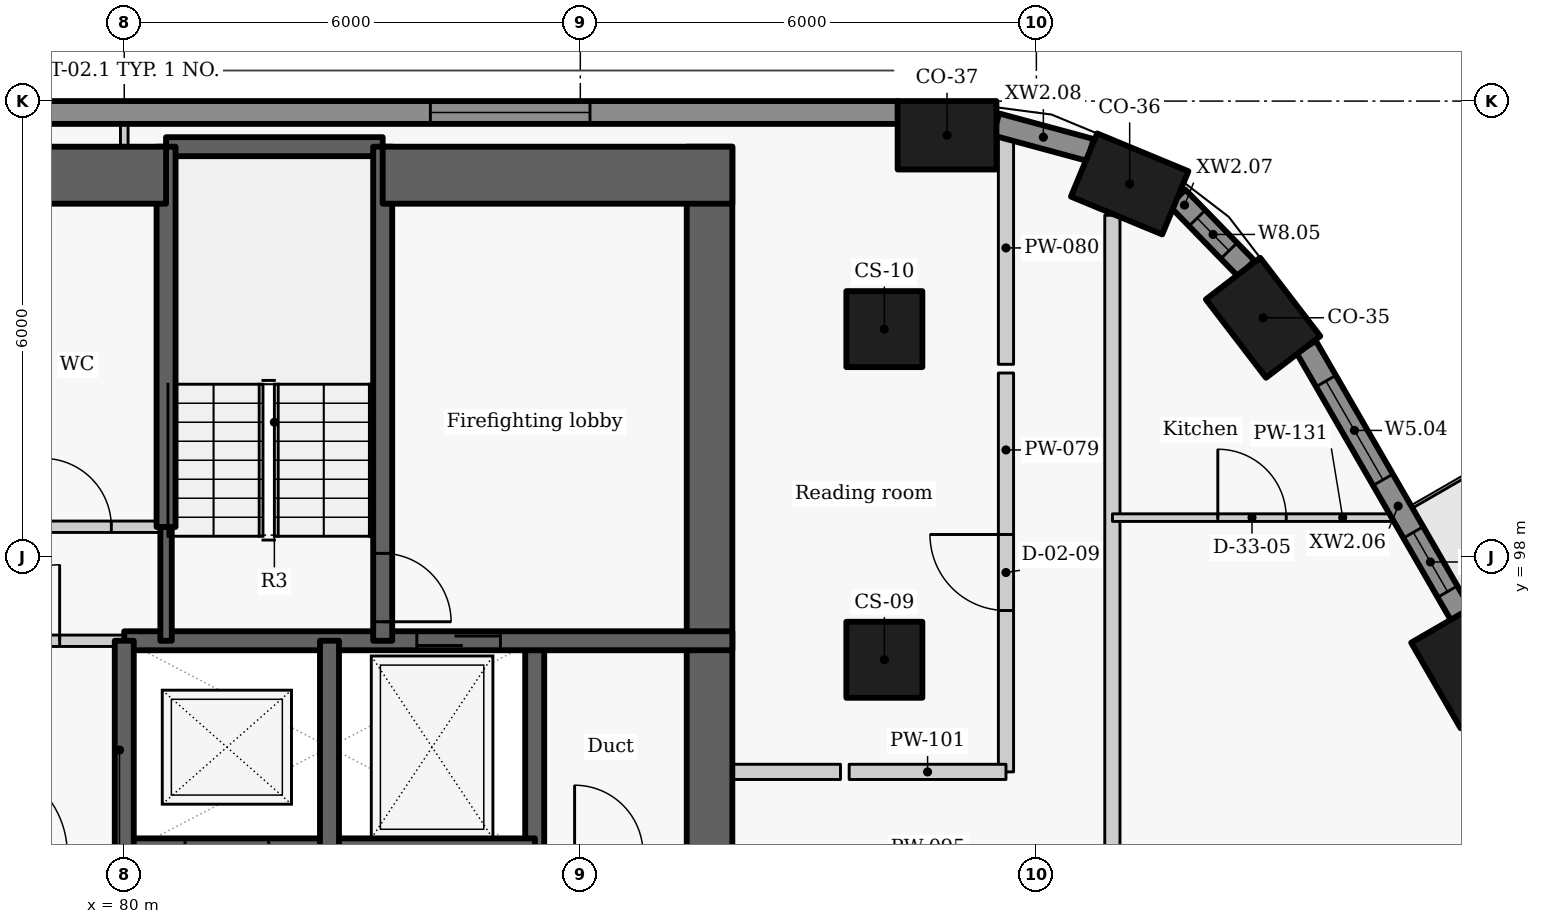
"""IFC4 building model, lengths in metres.
Left out: names, types, materials, properties, quantities, classifications, styles, units other than length and angle.
Written with IfcOpenShell. Run it as: python <this file> out.ifc"""

import sys

from ifc_helpers import new_model, si_unit, direction, frame, frame_2d, origin, origin_2d, place, context, subcontext, project, spatial, rectangle, extrude, element, fill, save


model = new_model("IFC4")
c1 = context("Model", 3, precision=1e-05, world=origin(), true_north=direction((0.0, 1.0)))
c2 = subcontext(c1, "Body", "Model", "MODEL_VIEW")
j1 = project(units=[si_unit("LENGTHUNIT", "METRE"), si_unit("PLANEANGLEUNIT", "RADIAN")], contexts=[c1])
p1 = place(None, origin())
s1 = spatial("IfcSite", under=j1, at=p1, CompositionType="ELEMENT")
p2 = place(p1, origin())
s2 = spatial("IfcBuilding", under=s1, at=p2, CompositionType="ELEMENT")
p3 = place(p2, frame((0.0, 0.0, 160.2)))
s3 = spatial("IfcBuildingStorey", under=s2, at=p3, CompositionType="ELEMENT", Elevation=160.2)
for number, where, z_axis, x_axis in (
    (1, (97.646, 96.537, 0.0), (0.0, 0.0, 1.0), (-0.5, 0.866, 0.0)),
    (2, (94.982, 101.149, 0.0), (0.0, 0.0, 1.0), (-0.609, 0.793, 0.0)),
    (3, (93.227, 102.91, 0.0), (0.0, 0.0, 1.0), (-0.924, 0.383, 0.0)),
    (4, (90.825, 103.55, 0.0), (0.0, 0.0, 1.0), (-1.0, 0.0, 0.0)),
):
    element("IfcColumn", number, at=place(p3, frame(where, z_axis=z_axis, x_axis=x_axis)), inside=s3, PredefinedType="COLUMN", context=c2, shape_type="SweptSolid", body=[
        extrude(rectangle(XDim=1.3, YDim=0.9, at=origin_2d()), origin(), (0.0, 0.0, 1.0), 3.3),
    ])
for number, where, z_axis, x_axis in (
    (5, (90.0, 96.65, 0.0), (0.0, 0.0, 1.0), (0.0, 1.0, 0.0)),
    (6, (90.0, 101.0, 0.0), (0.0, 0.0, 1.0), (0.0, 1.0, 0.0)),
):
    element("IfcColumn", number, at=place(p3, frame(where, z_axis=z_axis, x_axis=x_axis)), inside=s3, PredefinedType="COLUMN", context=c2, shape_type="SweptSolid", body=[
        extrude(rectangle(XDim=1.0, YDim=1.0, at=origin_2d()), origin(), (0.0, 0.0, 1.0), 3.3),
    ])
p4 = place(p3, frame((97.582, 97.247, 0.0), z_axis=(0.0, 0.0, 1.0), x_axis=(-0.500018589245, 0.866014671013, 0.0)))
e7 = element("IfcWall", 7, at=p4, inside=s3, PredefinedType="SOLIDWALL", context=c2, shape_type="SweptSolid", body=[
    extrude(rectangle(XDim=4.068, YDim=0.3, at=frame_2d((2.034, 0.0))), origin(), (0.0, 0.0, 1.0), 2.425),
])
p5 = place(p4, frame((0.346, 0.0, 0.9)))
e8 = element("IfcOpeningElement", 8, at=p5, cuts=e7, PredefinedType="OPENING", context=c2, shape_type="SweptSolid", body=[
    extrude(rectangle(XDim=0.9, YDim=1.1, at=frame_2d((0.45, 0.55))), frame((0.0, 0.16, 0.0), z_axis=(0.0, -1.0, 0.0), x_axis=(1.0, 0.0, 0.0)), (0.0, 0.0, 1.0), 0.32),
])
p6 = place(p4, frame((2.045, 0.0, 0.9)))
e9 = element("IfcOpeningElement", 9, at=p6, cuts=e7, PredefinedType="OPENING", context=c2, shape_type="SweptSolid", body=[
    extrude(rectangle(XDim=1.5, YDim=1.1, at=frame_2d((0.75, 0.55))), frame((0.0, 0.16, 0.0), z_axis=(0.0, -1.0, 0.0), x_axis=(1.0, 0.0, 0.0)), (0.0, 0.0, 1.0), 0.32),
])
p7 = place(p3, frame((94.763, 101.795, 0.0), z_axis=(0.0, 0.0, 1.0), x_axis=(-0.697598997785, 0.716488407645, 0.0)))
e10 = element("IfcWall", 10, at=p7, inside=s3, PredefinedType="SOLIDWALL", context=c2, shape_type="SweptSolid", body=[
    extrude(rectangle(XDim=1.305, YDim=0.3, at=frame_2d((0.653, 0.0))), origin(), (0.0, 0.0, 1.0), 2.425),
])
p8 = place(p7, frame((0.328, 0.0, 0.9)))
e11 = element("IfcOpeningElement", 11, at=p8, cuts=e10, PredefinedType="OPENING", context=c2, shape_type="SweptSolid", body=[
    extrude(rectangle(XDim=0.6, YDim=1.1, at=frame_2d((0.3, 0.55))), frame((0.0, 0.16, 0.0), z_axis=(0.0, -1.0, 0.0), x_axis=(1.0, 0.0, 0.0)), (0.0, 0.0, 1.0), 0.32),
])
p9 = place(p3, frame((92.713, 103.356, 0.0), z_axis=(0.0, 0.0, 1.0), x_axis=(-0.965274225809, 0.26123872031, 0.0)))
e12 = element("IfcWall", 12, at=p9, inside=s3, PredefinedType="SOLIDWALL", context=c2, shape_type="SweptSolid", body=[
    extrude(rectangle(XDim=1.287, YDim=0.3, at=frame_2d((0.644, 0.0))), origin(), (0.0, 0.0, 1.0), 2.425),
])
p10 = place(p3, frame((90.179, 103.85, 0.0), z_axis=(0.0, 0.0, 1.0), x_axis=(-1.0, 0.0, 0.0)))
e13 = element("IfcWall", 13, at=p10, inside=s3, PredefinedType="SOLIDWALL", context=c2, shape_type="SweptSolid", body=[
    extrude(rectangle(XDim=20.391, YDim=0.3, at=frame_2d((10.196, 0.0))), origin(), (0.0, 0.0, 1.0), 2.425),
])
p11 = place(p10, frame((4.051, 0.0, 0.9)))
e14 = element("IfcOpeningElement", 14, at=p11, cuts=e13, PredefinedType="OPENING", context=c2, shape_type="SweptSolid", body=[
    extrude(rectangle(XDim=2.1, YDim=1.1, at=frame_2d((1.05, 0.55))), frame((0.0, 0.16, 0.0), z_axis=(0.0, -1.0, 0.0), x_axis=(1.0, 0.0, 0.0)), (0.0, 0.0, 1.0), 0.32),
])
p12 = place(p10, frame((14.212, 0.0, 0.9)))
e15 = element("IfcOpeningElement", 15, at=p12, cuts=e13, PredefinedType="OPENING", context=c2, shape_type="SweptSolid", body=[
    extrude(rectangle(XDim=2.1, YDim=1.1, at=frame_2d((1.05, 0.55))), frame((0.0, 0.16, 0.0), z_axis=(0.0, -1.0, 0.0), x_axis=(1.0, 0.0, 0.0)), (0.0, 0.0, 1.0), 0.32),
])
p13 = place(p3, frame((85.4, 94.1, -0.275), z_axis=(0.0, 0.0, 1.0), x_axis=(0.0, 1.0, 0.0)))
e16 = element("IfcWall", 16, at=p13, inside=s3, PredefinedType="SHEAR", context=c2, shape_type="SweptSolid", body=[
    extrude(rectangle(XDim=2.8, YDim=0.25, at=frame_2d((1.4, 0.0))), origin(), (0.0, 0.0, 1.0), 3.3),
])
p14 = place(p3, frame((87.7, 103.4, -0.275), z_axis=(0.0, 0.0, 1.0), x_axis=(0.0, -1.0, 0.0)))
e17 = element("IfcWall", 17, at=p14, inside=s3, PredefinedType="SHEAR", context=c2, shape_type="SweptSolid", body=[
    extrude(rectangle(XDim=15.6, YDim=0.6, at=frame_2d((7.8, 0.0))), origin(), (0.0, 0.0, 1.0), 3.3),
])
p15 = place(p14, frame((10.248, 0.0, 0.275)))
e18 = element("IfcOpeningElement", 18, at=p15, cuts=e17, PredefinedType="OPENING", context=c2, shape_type="SweptSolid", body=[
    extrude(rectangle(XDim=1.5, YDim=2.1, at=frame_2d((0.75, 1.05))), frame((0.0, 0.31, 0.0), z_axis=(0.0, -1.0, 0.0), x_axis=(1.0, 0.0, 0.0)), (0.0, 0.0, 1.0), 0.62),
])
p16 = place(p3, frame((79.997, 94.1, -0.275), z_axis=(0.0, 0.0, 1.0), x_axis=(1.0, 0.0, 0.0)))
e19 = element("IfcWall", 19, at=p16, inside=s3, PredefinedType="SHEAR", context=c2, shape_type="SweptSolid", body=[
    extrude(rectangle(XDim=5.406, YDim=0.4, at=frame_2d((2.703, 0.0))), origin(), (0.0, 0.0, 1.0), 3.3),
])
p17 = place(p16, frame((0.803, 0.0, 0.275)))
e20 = element("IfcOpeningElement", 20, at=p17, cuts=e19, PredefinedType="OPENING", context=c2, shape_type="SweptSolid", body=[
    extrude(rectangle(XDim=1.1, YDim=2.1, at=frame_2d((0.55, 1.05))), frame((0.0, 0.21, 0.0), z_axis=(0.0, -1.0, 0.0), x_axis=(1.0, 0.0, 0.0)), (0.0, 0.0, 1.0), 0.42),
])
p18 = place(p3, frame((80.0, 96.9, -0.275), z_axis=(0.0, 0.0, 1.0), x_axis=(1.0, 0.0, 0.0)))
e21 = element("IfcWall", 21, at=p18, inside=s3, PredefinedType="SHEAR", context=c2, shape_type="SweptSolid", body=[
    extrude(rectangle(XDim=8.0, YDim=0.25, at=frame_2d((4.0, 0.0))), origin(), (0.0, 0.0, 1.0), 3.3),
])
p19 = place(p18, frame((3.849, 0.0, 0.275)))
e22 = element("IfcOpeningElement", 22, at=p19, cuts=e21, PredefinedType="OPENING", context=c2, shape_type="SweptSolid", body=[
    extrude(rectangle(XDim=1.1, YDim=2.1, at=frame_2d((0.55, 1.05))), frame((0.0, 0.135, 0.0), z_axis=(0.0, -1.0, 0.0), x_axis=(1.0, 0.0, 0.0)), (0.0, 0.0, 1.0), 0.27),
])
p20 = place(p3, frame((80.0, 94.1, -0.275), z_axis=(0.0, 0.0, 1.0), x_axis=(0.0, 1.0, 0.0)))
e23 = element("IfcWall", 23, at=p20, inside=s3, PredefinedType="SHEAR", context=c2, shape_type="SweptSolid", body=[
    extrude(rectangle(XDim=2.8, YDim=0.25, at=frame_2d((1.4, 0.0))), origin(), (0.0, 0.0, 1.0), 3.3),
])
p21 = place(p3, frame((77.3, 96.9, 0.0), z_axis=(0.0, 0.0, 1.0), x_axis=(1.0, 0.0, 0.0)))
e24 = element("IfcWall", 24, at=p21, inside=s3, PredefinedType="PARTITIONING", context=c2, shape_type="SweptSolid", body=[
    extrude(rectangle(XDim=2.7, YDim=0.15, at=frame_2d((1.35, 0.0))), origin(), (0.0, 0.0, 1.0), 3.025),
])
p22 = place(p21, frame((0.85, 0.0, 0.0)))
e25 = element("IfcOpeningElement", 25, at=p22, cuts=e24, PredefinedType="OPENING", context=c2, shape_type="SweptSolid", body=[
    extrude(rectangle(XDim=1.0, YDim=2.1, at=frame_2d((0.5, 1.05))), frame((0.0, 0.085, 0.0), z_axis=(0.0, -1.0, 0.0), x_axis=(1.0, 0.0, 0.0)), (0.0, 0.0, 1.0), 0.17),
])
p23 = place(p3, frame((82.7, 94.1, -0.275), z_axis=(0.0, 0.0, 1.0), x_axis=(0.0, 1.0, 0.0)))
e26 = element("IfcWall", 26, at=p23, inside=s3, PredefinedType="SHEAR", context=c2, shape_type="SweptSolid", body=[
    extrude(rectangle(XDim=2.8, YDim=0.25, at=frame_2d((1.4, 0.0))), origin(), (0.0, 0.0, 1.0), 3.3),
])
p24 = place(p3, frame((80.55, 103.4, -0.275), z_axis=(0.0, 0.0, 1.0), x_axis=(1.0, 0.0, 0.0)))
e27 = element("IfcWall", 27, at=p24, inside=s3, PredefinedType="SHEAR", context=c2, shape_type="SweptSolid", body=[
    extrude(rectangle(XDim=2.85, YDim=0.25, at=frame_2d((1.425, 0.0))), origin(), (0.0, 0.0, 1.0), 3.3),
])
p25 = place(p3, frame((83.4, 103.4, -0.275), z_axis=(0.0, 0.0, 1.0), x_axis=(0.0, -1.0, 0.0)))
e28 = element("IfcWall", 28, at=p25, inside=s3, PredefinedType="SHEAR", context=c2, shape_type="SweptSolid", body=[
    extrude(rectangle(XDim=6.5, YDim=0.25, at=frame_2d((3.25, 0.0))), origin(), (0.0, 0.0, 1.0), 3.3),
])
p26 = place(p25, frame((5.35, 0.0, 0.275)))
e29 = element("IfcOpeningElement", 29, at=p26, cuts=e28, PredefinedType="OPENING", context=c2, shape_type="SweptSolid", body=[
    extrude(rectangle(XDim=0.9, YDim=2.1, at=frame_2d((0.45, 1.05))), frame((0.0, 0.135, 0.0), z_axis=(0.0, -1.0, 0.0), x_axis=(1.0, 0.0, 0.0)), (0.0, 0.0, 1.0), 0.27),
])
p27 = place(p3, frame((80.55, 96.9, -0.275), z_axis=(0.0, 0.0, 1.0), x_axis=(0.0, 1.0, 0.0)))
e30 = element("IfcWall", 30, at=p27, inside=s3, PredefinedType="SHEAR", context=c2, shape_type="SweptSolid", body=[
    extrude(rectangle(XDim=1.503, YDim=0.15, at=frame_2d((0.751, 0.0))), origin(), (0.0, 0.0, 1.0), 3.3),
])
p28 = place(p3, frame((80.55, 98.397, -0.275), z_axis=(0.0, 0.0, 1.0), x_axis=(0.0, 1.0, 0.0)))
e31 = element("IfcWall", 31, at=p28, inside=s3, PredefinedType="SHEAR", context=c2, shape_type="SweptSolid", body=[
    extrude(rectangle(XDim=5.003, YDim=0.25, at=frame_2d((2.501, 0.0))), origin(), (0.0, 0.0, 1.0), 3.3),
])
p29 = place(p3, frame((75.35, 103.025, -0.275), z_axis=(0.0, 0.0, 1.0), x_axis=(1.0, 0.0, 0.0)))
e32 = element("IfcWall", 32, at=p29, inside=s3, PredefinedType="SHEAR", context=c2, shape_type="SweptSolid", body=[
    extrude(rectangle(XDim=5.2, YDim=0.75, at=frame_2d((2.6, 0.0))), origin(), (0.0, 0.0, 1.0), 3.3),
])
p30 = place(p3, frame((83.4, 103.025, -0.275), z_axis=(0.0, 0.0, 1.0), x_axis=(1.0, 0.0, 0.0)))
e33 = element("IfcWall", 33, at=p30, inside=s3, PredefinedType="SHEAR", context=c2, shape_type="SweptSolid", body=[
    extrude(rectangle(XDim=4.6, YDim=0.75, at=frame_2d((2.3, 0.0))), origin(), (0.0, 0.0, 1.0), 3.3),
])
p31 = place(p3, frame((75.35, 98.4, 0.0), z_axis=(0.0, 0.0, 1.0), x_axis=(1.0, 0.0, 0.0)))
e34 = element("IfcWall", 34, at=p31, inside=s3, PredefinedType="PARTITIONING", context=c2, shape_type="SweptSolid", body=[
    extrude(rectangle(XDim=5.2, YDim=0.15, at=frame_2d((2.6, 0.0))), origin(), (0.0, 0.0, 1.0), 3.025),
])
p32 = place(p31, frame((0.2, 0.0, 0.0)))
e35 = element("IfcOpeningElement", 35, at=p32, cuts=e34, PredefinedType="OPENING", context=c2, shape_type="SweptSolid", body=[
    extrude(rectangle(XDim=0.9, YDim=2.1, at=frame_2d((0.45, 1.05))), frame((0.0, 0.085, 0.0), z_axis=(0.0, -1.0, 0.0), x_axis=(1.0, 0.0, 0.0)), (0.0, 0.0, 1.0), 0.17),
])
p33 = place(p31, frame((1.63, 0.0, 0.0)))
e36 = element("IfcOpeningElement", 36, at=p33, cuts=e34, PredefinedType="OPENING", context=c2, shape_type="SweptSolid", body=[
    extrude(rectangle(XDim=0.9, YDim=2.1, at=frame_2d((0.45, 1.05))), frame((0.0, 0.085, 0.0), z_axis=(0.0, -1.0, 0.0), x_axis=(1.0, 0.0, 0.0)), (0.0, 0.0, 1.0), 0.17),
])
p34 = place(p31, frame((3.58, 0.0, 0.0)))
e37 = element("IfcOpeningElement", 37, at=p34, cuts=e34, PredefinedType="OPENING", context=c2, shape_type="SweptSolid", body=[
    extrude(rectangle(XDim=0.9, YDim=2.1, at=frame_2d((0.45, 1.05))), frame((0.0, 0.085, 0.0), z_axis=(0.0, -1.0, 0.0), x_axis=(1.0, 0.0, 0.0)), (0.0, 0.0, 1.0), 0.17),
])
p35 = place(p3, frame((91.6, 95.175, 0.0), z_axis=(0.0, 0.0, 1.0), x_axis=(0.0, 1.0, 0.0)))
e38 = element("IfcWall", 38, at=p35, inside=s3, PredefinedType="PARTITIONING", context=c2, shape_type="SweptSolid", body=[
    extrude(rectangle(XDim=5.248, YDim=0.2, at=frame_2d((2.624, 0.0))), origin(), (0.0, 0.0, 1.0), 3.025),
])
p36 = place(p35, frame((2.123, 0.0, 0.0)))
e39 = element("IfcOpeningElement", 39, at=p36, cuts=e38, PredefinedType="OPENING", context=c2, shape_type="SweptSolid", body=[
    extrude(rectangle(XDim=1.0, YDim=2.1, at=frame_2d((0.5, 1.05))), frame((0.0, 0.11, 0.0), z_axis=(0.0, -1.0, 0.0), x_axis=(1.0, 0.0, 0.0)), (0.0, 0.0, 1.0), 0.22),
])
p37 = place(p3, frame((91.6, 100.537, 0.0), z_axis=(0.0, 0.0, 1.0), x_axis=(0.0, 1.0, 0.0)))
e40 = element("IfcWall", 40, at=p37, inside=s3, PredefinedType="PARTITIONING", context=c2, shape_type="SweptSolid", body=[
    extrude(rectangle(XDim=3.062, YDim=0.2, at=frame_2d((1.531, 0.0))), origin(), (0.0, 0.0, 1.0), 2.405),
])
p38 = place(p3, frame((93.0, 102.498, 0.0), z_axis=(0.0, 0.0, 1.0), x_axis=(0.0, -1.0, 0.0)))
e41 = element("IfcWall", 41, at=p38, inside=s3, PredefinedType="PARTITIONING", context=c2, shape_type="SweptSolid", body=[
    extrude(rectangle(XDim=45.665, YDim=0.2, at=frame_2d((22.833, 0.0))), origin(), (0.0, 0.0, 1.0), 2.405),
])
p39 = place(p38, frame((37.581, 0.0, 0.0)))
e42 = element("IfcOpeningElement", 42, at=p39, cuts=e41, PredefinedType="OPENING", context=c2, shape_type="SweptSolid", body=[
    extrude(rectangle(XDim=1.0, YDim=2.1, at=frame_2d((0.5, 1.05))), frame((0.0, 0.11, 0.0), z_axis=(0.0, -1.0, 0.0), x_axis=(1.0, 0.0, 0.0)), (0.0, 0.0, 1.0), 0.22),
])
p40 = place(p38, frame((29.223, 0.0, 0.0)))
e43 = element("IfcOpeningElement", 43, at=p40, cuts=e41, PredefinedType="OPENING", context=c2, shape_type="SweptSolid", body=[
    extrude(rectangle(XDim=1.0, YDim=2.1, at=frame_2d((0.5, 1.05))), frame((0.0, 0.11, 0.0), z_axis=(0.0, -1.0, 0.0), x_axis=(1.0, 0.0, 0.0)), (0.0, 0.0, 1.0), 0.22),
])
p41 = place(p38, frame((19.223, 0.0, 0.0)))
e44 = element("IfcOpeningElement", 44, at=p41, cuts=e41, PredefinedType="OPENING", context=c2, shape_type="SweptSolid", body=[
    extrude(rectangle(XDim=1.0, YDim=2.1, at=frame_2d((0.5, 1.05))), frame((0.0, 0.11, 0.0), z_axis=(0.0, -1.0, 0.0), x_axis=(1.0, 0.0, 0.0)), (0.0, 0.0, 1.0), 0.22),
])
p42 = place(p3, frame((88.0, 95.175, 0.0), z_axis=(0.0, 0.0, 1.0), x_axis=(1.0, 0.0, 0.0)))
e45 = element("IfcWall", 45, at=p42, inside=s3, PredefinedType="PARTITIONING", context=c2, shape_type="SweptSolid", body=[
    extrude(rectangle(XDim=1.423, YDim=0.2, at=frame_2d((0.711, 0.0))), origin(), (0.0, 0.0, 1.0), 3.025),
])
p43 = place(p3, frame((89.537, 95.175, 0.0), z_axis=(0.0, 0.0, 1.0), x_axis=(1.0, 0.0, 0.0)))
e46 = element("IfcWall", 46, at=p43, inside=s3, PredefinedType="PARTITIONING", context=c2, shape_type="SweptSolid", body=[
    extrude(rectangle(XDim=2.063, YDim=0.2, at=frame_2d((1.031, 0.0))), origin(), (0.0, 0.0, 1.0), 2.505),
])
p44 = place(p3, frame((80.0, 103.4, 0.0), z_axis=(0.0, 0.0, 1.0), x_axis=(0.0, 1.0, 0.0)))
e47 = element("IfcWall", 47, at=p44, inside=s3, PredefinedType="PARTITIONING", context=c2, shape_type="SweptSolid", body=[
    extrude(rectangle(XDim=0.3, YDim=0.1, at=frame_2d((0.15, 0.0))), origin(), (0.0, 0.0, 1.0), 3.025),
])
p45 = place(p3, frame((93.001, 98.52, 0.0), z_axis=(0.0, 0.0, 1.0), x_axis=(1.0, 0.0, 0.0)))
e48 = element("IfcWall", 48, at=p45, inside=s3, PredefinedType="PARTITIONING", context=c2, shape_type="SweptSolid", body=[
    extrude(rectangle(XDim=3.673, YDim=0.1, at=frame_2d((1.836, 0.0))), origin(), (0.0, 0.0, 1.0), 2.405),
])
p46 = place(p45, frame((1.386, 0.0, 0.0)))
e49 = element("IfcOpeningElement", 49, at=p46, cuts=e48, PredefinedType="OPENING", context=c2, shape_type="SweptSolid", body=[
    extrude(rectangle(XDim=0.9, YDim=2.1, at=frame_2d((0.45, 1.05))), frame((0.0, 0.06, 0.0), z_axis=(0.0, -1.0, 0.0), x_axis=(1.0, 0.0, 0.0)), (0.0, 0.0, 1.0), 0.12),
])
p47 = place(p5, origin())
e50 = element("IfcWindow", 50, at=p47, inside=s3, PartitioningType="SINGLE_PANEL", PredefinedType="WINDOW", context=c2, shape_type="SweptSolid", body=[
    extrude(rectangle(XDim=0.9, YDim=1.1, at=frame_2d((0.45, 0.55))), frame((0.0, 0.03, 0.0), z_axis=(0.0, -1.0, 0.0), x_axis=(1.0, 0.0, 0.0)), (0.0, 0.0, 1.0), 0.06),
])
fill(e8, e50)
p48 = place(p6, origin())
e51 = element("IfcWindow", 51, at=p48, inside=s3, PartitioningType="SINGLE_PANEL", PredefinedType="WINDOW", context=c2, shape_type="SweptSolid", body=[
    extrude(rectangle(XDim=1.5, YDim=1.1, at=frame_2d((0.75, 0.55))), frame((0.0, 0.03, 0.0), z_axis=(0.0, -1.0, 0.0), x_axis=(1.0, 0.0, 0.0)), (0.0, 0.0, 1.0), 0.06),
])
fill(e9, e51)
p49 = place(p8, origin())
e52 = element("IfcWindow", 52, at=p49, inside=s3, PartitioningType="SINGLE_PANEL", PredefinedType="WINDOW", context=c2, shape_type="SweptSolid", body=[
    extrude(rectangle(XDim=0.6, YDim=1.1, at=frame_2d((0.3, 0.55))), frame((0.0, 0.03, 0.0), z_axis=(0.0, -1.0, 0.0), x_axis=(1.0, 0.0, 0.0)), (0.0, 0.0, 1.0), 0.06),
])
fill(e11, e52)
p50 = place(p11, origin())
e53 = element("IfcWindow", 53, at=p50, inside=s3, PartitioningType="SINGLE_PANEL", PredefinedType="WINDOW", context=c2, shape_type="SweptSolid", body=[
    extrude(rectangle(XDim=2.1, YDim=1.1, at=frame_2d((1.05, 0.55))), frame((0.0, 0.03, 0.0), z_axis=(0.0, -1.0, 0.0), x_axis=(1.0, 0.0, 0.0)), (0.0, 0.0, 1.0), 0.06),
])
fill(e14, e53)
p51 = place(p19, origin())
e54 = element("IfcDoor", 54, at=p51, inside=s3, OperationType="SLIDING_TO_LEFT", PredefinedType="DOOR", context=c2, shape_type="SweptSolid", body=[
    extrude(rectangle(XDim=1.1, YDim=2.1, at=frame_2d((0.55, 1.05))), frame((0.0, 0.025, 0.0), z_axis=(0.0, -1.0, 0.0), x_axis=(1.0, 0.0, 0.0)), (0.0, 0.0, 1.0), 0.05),
])
fill(e22, e54)
p52 = place(p22, origin())
e55 = element("IfcDoor", 55, at=p52, inside=s3, OperationType="SINGLE_SWING_RIGHT", PredefinedType="DOOR", context=c2, shape_type="SweptSolid", body=[
    extrude(rectangle(XDim=1.0, YDim=2.1, at=frame_2d((0.5, 1.05))), frame((0.0, 0.025, 0.0), z_axis=(0.0, -1.0, 0.0), x_axis=(1.0, 0.0, 0.0)), (0.0, 0.0, 1.0), 0.05),
])
fill(e25, e55)
p53 = place(p34, origin())
e56 = element("IfcDoor", 56, at=p53, inside=s3, OperationType="SINGLE_SWING_LEFT", PredefinedType="DOOR", context=c2, shape_type="SweptSolid", body=[
    extrude(rectangle(XDim=0.9, YDim=2.1, at=frame_2d((0.45, 1.05))), frame((0.0, 0.025, 0.0), z_axis=(0.0, -1.0, 0.0), x_axis=(1.0, 0.0, 0.0)), (0.0, 0.0, 1.0), 0.05),
])
fill(e37, e56)
p54 = place(p26, origin())
e57 = element("IfcDoor", 57, at=p54, inside=s3, OperationType="SINGLE_SWING_RIGHT", PredefinedType="DOOR", context=c2, shape_type="SweptSolid", body=[
    extrude(rectangle(XDim=0.9, YDim=2.1, at=frame_2d((0.45, 1.05))), frame((0.0, 0.025, 0.0), z_axis=(0.0, -1.0, 0.0), x_axis=(1.0, 0.0, 0.0)), (0.0, 0.0, 1.0), 0.05),
])
fill(e29, e57)
p55 = place(p46, origin())
e58 = element("IfcDoor", 58, at=p55, inside=s3, OperationType="SINGLE_SWING_LEFT", PredefinedType="DOOR", context=c2, shape_type="SweptSolid", body=[
    extrude(rectangle(XDim=0.9, YDim=2.1, at=frame_2d((0.45, 1.05))), frame((0.0, 0.025, 0.0), z_axis=(0.0, -1.0, 0.0), x_axis=(1.0, 0.0, 0.0)), (0.0, 0.0, 1.0), 0.05),
])
fill(e49, e58)
p56 = place(p36, origin())
e59 = element("IfcDoor", 59, at=p56, inside=s3, OperationType="SINGLE_SWING_RIGHT", PredefinedType="DOOR", context=c2, shape_type="SweptSolid", body=[
    extrude(rectangle(XDim=1.0, YDim=2.1, at=frame_2d((0.5, 1.05))), frame((0.0, 0.025, 0.0), z_axis=(0.0, -1.0, 0.0), x_axis=(1.0, 0.0, 0.0)), (0.0, 0.0, 1.0), 0.05),
])
fill(e39, e59)
save(model, sys.argv[1])
